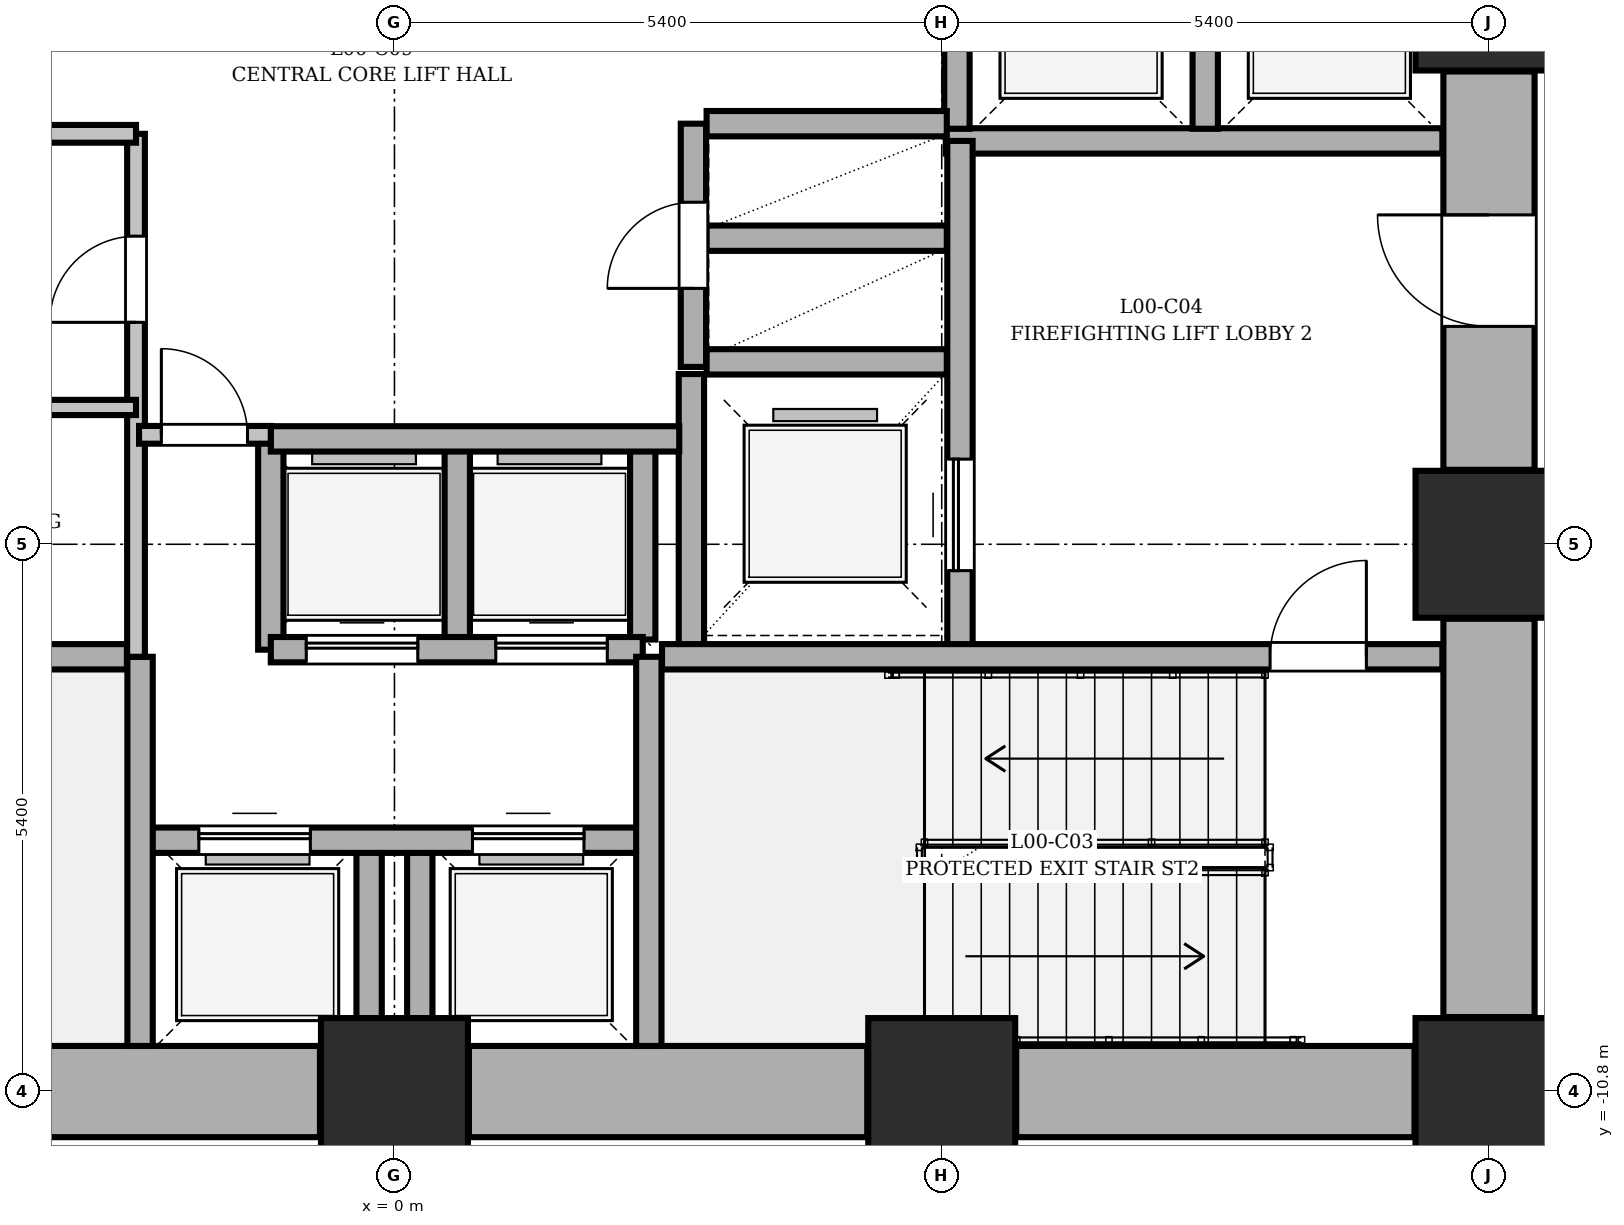
"""IFC4 building model, lengths in metres.
Left out: names, types, materials, properties, quantities, classifications, styles, units other than length and angle.
Written with IfcOpenShell. Run it as: python <this file> out.ifc"""

import sys

from ifc_helpers import new_model, si_unit, direction, frame, frame_2d, origin, origin_2d, place, context, subcontext, project, spatial, rectangle, extrude, element, fill, save


model = new_model("IFC4")
c1 = context("Model", 3, precision=1e-05, world=origin(), true_north=direction((0.0, 1.0)))
c2 = subcontext(c1, "Body", "Model", "MODEL_VIEW")
j1 = project(units=[si_unit("LENGTHUNIT", "METRE"), si_unit("PLANEANGLEUNIT", "RADIAN")], contexts=[c1])
p1 = place(None, origin())
s1 = spatial("IfcSite", under=j1, at=p1, CompositionType="ELEMENT")
p2 = place(p1, origin())
s2 = spatial("IfcBuilding", under=s1, at=p2, CompositionType="ELEMENT")
p3 = place(p2, origin())
s3 = spatial("IfcBuildingStorey", under=s2, at=p3, CompositionType="ELEMENT", Elevation=0.0)
for number, where, z_axis, x_axis in (
    (1, (0.0, -10.8, 0.0), (0.0, 0.0, 1.0), (1.0, 0.0, 0.0)),
    (2, (5.4, -10.8, 0.0), (0.0, 0.0, 1.0), (1.0, 0.0, 0.0)),
    (3, (10.8, -10.8, 0.0), (0.0, 0.0, 1.0), (1.0, 0.0, 0.0)),
    (4, (10.8, -5.4, 0.0), (0.0, 0.0, 1.0), (1.0, 0.0, 0.0)),
    (5, (10.8, 0.0, 0.0), (0.0, 0.0, 1.0), (1.0, 0.0, 0.0)),
):
    element("IfcColumn", number, at=place(p3, frame(where, z_axis=z_axis, x_axis=x_axis)), inside=s3, PredefinedType="COLUMN", context=c2, shape_type="SweptSolid", body=[
        extrude(rectangle(XDim=1.45, YDim=1.45, at=origin_2d()), origin(), (0.0, 0.0, 1.0), 4.5),
    ])
for number, where, z_axis, x_axis in (
    (6, (10.8, -10.065, 0.0), (0.0, 0.0, 1.0), (0.0, 1.0, 0.0)),
    (7, (-4.665, -10.8, 0.0), (0.0, 0.0, 1.0), (1.0, 0.0, 0.0)),
):
    element("IfcWall", number, at=place(p3, frame(where, z_axis=z_axis, x_axis=x_axis)), inside=s3, PredefinedType="SHEAR", context=c2, shape_type="SweptSolid", body=[
        extrude(rectangle(XDim=3.93, YDim=0.9, at=frame_2d((1.965, 0.0))), origin(), (0.0, 0.0, 1.0), 4.5),
    ])
p4 = place(p3, frame((10.8, -4.665, 0.0), z_axis=(0.0, 0.0, 1.0), x_axis=(0.0, 1.0, 0.0)))
e8 = element("IfcWall", 8, at=p4, inside=s3, PredefinedType="SHEAR", context=c2, shape_type="SweptSolid", body=[
    extrude(rectangle(XDim=3.93, YDim=0.9, at=frame_2d((1.965, 0.0))), origin(), (0.0, 0.0, 1.0), 4.5),
])
p5 = place(p4, frame((1.415, 0.0, 0.0)))
e9 = element("IfcOpeningElement", 9, at=p5, cuts=e8, PredefinedType="OPENING", context=c2, shape_type="SweptSolid", body=[
    extrude(rectangle(XDim=1.1, YDim=2.1, at=frame_2d((0.55, 1.05))), frame((0.0, 0.46, 0.0), z_axis=(0.0, -1.0, 0.0), x_axis=(1.0, 0.0, 0.0)), (0.0, 0.0, 1.0), 0.92),
])
for number, where, z_axis, x_axis in (
    (10, (0.735, -10.8, 0.0), (0.0, 0.0, 1.0), (1.0, 0.0, 0.0)),
    (11, (6.135, -10.8, 0.0), (0.0, 0.0, 1.0), (1.0, 0.0, 0.0)),
):
    element("IfcWall", number, at=place(p3, frame(where, z_axis=z_axis, x_axis=x_axis)), inside=s3, PredefinedType="SHEAR", context=c2, shape_type="SweptSolid", body=[
        extrude(rectangle(XDim=3.93, YDim=0.9, at=frame_2d((1.965, 0.0))), origin(), (0.0, 0.0, 1.0), 4.5),
    ])
p6 = place(p3, frame((2.93, -6.51, 0.0), z_axis=(0.0, 0.0, 1.0), x_axis=(0.0, 1.0, 0.0)))
e12 = element("IfcWall", 12, at=p6, inside=s3, PredefinedType="SHEAR", context=c2, shape_type="SweptSolid", body=[
    extrude(rectangle(XDim=2.79, YDim=0.25, at=frame_2d((1.395, 0.0))), origin(), (0.0, 0.0, 1.0), 4.5),
])
p7 = place(p3, frame((5.44, -1.42, 0.0), z_axis=(0.0, 0.0, 1.0), x_axis=(1.0, 0.0, 0.0)))
e13 = element("IfcWall", 13, at=p7, inside=s3, PredefinedType="SHEAR", context=c2, shape_type="SweptSolid", body=[
    extrude(rectangle(XDim=4.9, YDim=0.25, at=frame_2d((2.45, 0.0))), origin(), (0.0, 0.0, 1.0), 4.5),
])
p8 = place(p3, frame((3.08, -3.6, 0.0), z_axis=(0.0, 0.0, 1.0), x_axis=(1.0, 0.0, 0.0)))
e14 = element("IfcWall", 14, at=p8, inside=s3, PredefinedType="SHEAR", context=c2, shape_type="SweptSolid", body=[
    extrude(rectangle(XDim=2.37, YDim=0.25, at=frame_2d((1.185, 0.0))), origin(), (0.0, 0.0, 1.0), 4.5),
])
p9 = place(p3, frame((5.58, -6.51, 0.0), z_axis=(0.0, 0.0, 1.0), x_axis=(0.0, 1.0, 0.0)))
e15 = element("IfcWall", 15, at=p9, inside=s3, PredefinedType="SHEAR", context=c2, shape_type="SweptSolid", body=[
    extrude(rectangle(XDim=5.09, YDim=0.25, at=frame_2d((2.545, 0.0))), origin(), (0.0, 0.0, 1.0), 4.5),
])
p10 = place(p9, frame((0.85, 0.0, 0.0)))
e16 = element("IfcOpeningElement", 16, at=p10, cuts=e15, PredefinedType="OPENING", context=c2, shape_type="SweptSolid", body=[
    extrude(rectangle(XDim=1.1, YDim=2.1, at=frame_2d((0.55, 1.05))), frame((0.0, 0.135, 0.0), z_axis=(0.0, -1.0, 0.0), x_axis=(1.0, 0.0, 0.0)), (0.0, 0.0, 1.0), 0.27),
])
for number, where, z_axis, x_axis in (
    (17, (0.62, -6.34, 0.0), (0.0, 0.0, 1.0), (0.0, 1.0, 0.0)),
    (18, (2.45, -6.34, 0.0), (0.0, 0.0, 1.0), (0.0, 1.0, 0.0)),
):
    element("IfcWall", number, at=place(p3, frame(where, z_axis=z_axis, x_axis=x_axis)), inside=s3, PredefinedType="SHEAR", context=c2, shape_type="SweptSolid", body=[
        extrude(rectangle(XDim=1.88, YDim=0.25, at=frame_2d((0.94, 0.0))), origin(), (0.0, 0.0, 1.0), 4.5),
    ])
for number, where, z_axis, x_axis in (
    (19, (-0.25, -10.075, 0.0), (0.0, 0.0, 1.0), (0.0, 1.0, 0.0)),
    (20, (0.25, -10.075, 0.0), (0.0, 0.0, 1.0), (0.0, 1.0, 0.0)),
):
    element("IfcWall", number, at=place(p3, frame(where, z_axis=z_axis, x_axis=x_axis)), inside=s3, PredefinedType="SHEAR", context=c2, shape_type="SweptSolid", body=[
        extrude(rectangle(XDim=1.635, YDim=0.25, at=frame_2d((0.817, 0.0))), origin(), (0.0, 0.0, 1.0), 4.5),
    ])
p11 = place(p3, frame((-1.22, -6.44, 0.0), z_axis=(0.0, 0.0, 1.0), x_axis=(0.0, 1.0, 0.0)))
e21 = element("IfcWall", 21, at=p11, inside=s3, PredefinedType="SHEAR", context=c2, shape_type="SweptSolid", body=[
    extrude(rectangle(XDim=2.08, YDim=0.25, at=frame_2d((1.04, 0.0))), origin(), (0.0, 0.0, 1.0), 4.5),
])
p12 = place(p3, frame((-1.22, -6.44, 0.0), z_axis=(0.0, 0.0, 1.0), x_axis=(1.0, 0.0, 0.0)))
e22 = element("IfcWall", 22, at=p12, inside=s3, PredefinedType="SHEAR", context=c2, shape_type="SweptSolid", body=[
    extrude(rectangle(XDim=3.67, YDim=0.25, at=frame_2d((1.835, 0.0))), origin(), (0.0, 0.0, 1.0), 4.5),
])
p13 = place(p12, frame((0.35, 0.0, 0.0)))
e23 = element("IfcOpeningElement", 23, at=p13, cuts=e22, PredefinedType="OPENING", context=c2, shape_type="SweptSolid", body=[
    extrude(rectangle(XDim=1.1, YDim=2.1, at=frame_2d((0.55, 1.05))), frame((0.0, 0.135, 0.0), z_axis=(0.0, -1.0, 0.0), x_axis=(1.0, 0.0, 0.0)), (0.0, 0.0, 1.0), 0.27),
])
p14 = place(p12, frame((2.22, 0.0, 0.0)))
e24 = element("IfcOpeningElement", 24, at=p14, cuts=e22, PredefinedType="OPENING", context=c2, shape_type="SweptSolid", body=[
    extrude(rectangle(XDim=1.1, YDim=2.1, at=frame_2d((0.55, 1.05))), frame((0.0, 0.135, 0.0), z_axis=(0.0, -1.0, 0.0), x_axis=(1.0, 0.0, 0.0)), (0.0, 0.0, 1.0), 0.27),
])
p15 = place(p3, frame((-2.48, -8.32, 0.0), z_axis=(0.0, 0.0, 1.0), x_axis=(1.0, 0.0, 0.0)))
e25 = element("IfcWall", 25, at=p15, inside=s3, PredefinedType="SHEAR", context=c2, shape_type="SweptSolid", body=[
    extrude(rectangle(XDim=4.93, YDim=0.25, at=frame_2d((2.465, 0.0))), origin(), (0.0, 0.0, 1.0), 4.5),
])
p16 = place(p15, frame((0.55, 0.0, 0.0)))
e26 = element("IfcOpeningElement", 26, at=p16, cuts=e25, PredefinedType="OPENING", context=c2, shape_type="SweptSolid", body=[
    extrude(rectangle(XDim=1.1, YDim=2.1, at=frame_2d((0.55, 1.05))), frame((0.0, 0.135, 0.0), z_axis=(0.0, -1.0, 0.0), x_axis=(1.0, 0.0, 0.0)), (0.0, 0.0, 1.0), 0.27),
])
p17 = place(p15, frame((3.25, 0.0, 0.0)))
e27 = element("IfcOpeningElement", 27, at=p17, cuts=e25, PredefinedType="OPENING", context=c2, shape_type="SweptSolid", body=[
    extrude(rectangle(XDim=1.1, YDim=2.1, at=frame_2d((0.55, 1.05))), frame((0.0, 0.135, 0.0), z_axis=(0.0, -1.0, 0.0), x_axis=(1.0, 0.0, 0.0)), (0.0, 0.0, 1.0), 0.27),
])
p18 = place(p3, frame((-1.22, -4.36, 0.0), z_axis=(0.0, 0.0, 1.0), x_axis=(1.0, 0.0, 0.0)))
e28 = element("IfcWall", 28, at=p18, inside=s3, PredefinedType="SHEAR", context=c2, shape_type="SweptSolid", body=[
    extrude(rectangle(XDim=4.03, YDim=0.25, at=frame_2d((2.015, 0.0))), origin(), (0.0, 0.0, 1.0), 4.5),
])
for number, where, z_axis, x_axis in (
    (29, (5.55, -1.3, 0.0), (0.0, 0.0, 1.0), (0.0, 1.0, 0.0)),
    (30, (8.0, -1.3, 0.0), (0.0, 0.0, 1.0), (0.0, 1.0, 0.0)),
):
    element("IfcWall", number, at=place(p3, frame(where, z_axis=z_axis, x_axis=x_axis)), inside=s3, PredefinedType="SHEAR", context=c2, shape_type="SweptSolid", body=[
        extrude(rectangle(XDim=2.04, YDim=0.25, at=frame_2d((1.02, 0.0))), origin(), (0.0, 0.0, 1.0), 4.5),
    ])
for number, where, z_axis, x_axis in (
    (31, (3.08, -2.38, 0.0), (0.0, 0.0, 1.0), (1.0, 0.0, 0.0)),
    (32, (3.08, -1.25, 0.0), (0.0, 0.0, 1.0), (1.0, 0.0, 0.0)),
):
    element("IfcWall", number, at=place(p3, frame(where, z_axis=z_axis, x_axis=x_axis)), inside=s3, PredefinedType="SHEAR", context=c2, shape_type="SweptSolid", body=[
        extrude(rectangle(XDim=2.37, YDim=0.25, at=frame_2d((1.185, 0.0))), origin(), (0.0, 0.0, 1.0), 4.5),
    ])
p19 = place(p3, frame((2.95, -3.65, 0.0), z_axis=(0.0, 0.0, 1.0), x_axis=(0.0, 1.0, 0.0)))
e33 = element("IfcWall", 33, at=p19, inside=s3, PredefinedType="SHEAR", context=c2, shape_type="SweptSolid", body=[
    extrude(rectangle(XDim=2.4, YDim=0.25, at=frame_2d((1.2, 0.0))), origin(), (0.0, 0.0, 1.0), 4.5),
])
p20 = place(p19, frame((0.775, 0.0, 0.0)))
e34 = element("IfcOpeningElement", 34, at=p20, cuts=e33, PredefinedType="OPENING", context=c2, shape_type="SweptSolid", body=[
    extrude(rectangle(XDim=0.85, YDim=2.1, at=frame_2d((0.425, 1.05))), frame((0.0, 0.135, 0.0), z_axis=(0.0, -1.0, 0.0), x_axis=(1.0, 0.0, 0.0)), (0.0, 0.0, 1.0), 0.27),
])
p21 = place(p3, frame((2.64, -6.51, 0.0), z_axis=(0.0, 0.0, 1.0), x_axis=(1.0, 0.0, 0.0)))
e35 = element("IfcWall", 35, at=p21, inside=s3, PredefinedType="SHEAR", context=c2, shape_type="SweptSolid", body=[
    extrude(rectangle(XDim=7.7, YDim=0.25, at=frame_2d((3.85, 0.0))), origin(), (0.0, 0.0, 1.0), 4.5),
])
p22 = place(p21, frame((6.0, 0.0, 0.0)))
e36 = element("IfcOpeningElement", 36, at=p22, cuts=e35, PredefinedType="OPENING", context=c2, shape_type="SweptSolid", body=[
    extrude(rectangle(XDim=0.95, YDim=2.1, at=frame_2d((0.475, 1.05))), frame((0.0, 0.135, 0.0), z_axis=(0.0, -1.0, 0.0), x_axis=(1.0, 0.0, 0.0)), (0.0, 0.0, 1.0), 0.27),
])
for number, where, z_axis, x_axis in (
    (37, (2.51, -10.35, 0.0), (0.0, 0.0, 1.0), (0.0, 1.0, 0.0)),
    (38, (-2.51, -10.35, 0.0), (0.0, 0.0, 1.0), (0.0, 1.0, 0.0)),
):
    element("IfcWall", number, at=place(p3, frame(where, z_axis=z_axis, x_axis=x_axis)), inside=s3, PredefinedType="SHEAR", context=c2, shape_type="SweptSolid", body=[
        extrude(rectangle(XDim=3.84, YDim=0.25, at=frame_2d((1.92, 0.0))), origin(), (0.0, 0.0, 1.0), 4.5),
    ])
p23 = place(p3, frame((-10.34, -6.51, 0.0), z_axis=(0.0, 0.0, 1.0), x_axis=(1.0, 0.0, 0.0)))
e39 = element("IfcWall", 39, at=p23, inside=s3, PredefinedType="SHEAR", context=c2, shape_type="SweptSolid", body=[
    extrude(rectangle(XDim=7.7, YDim=0.25, at=frame_2d((3.85, 0.0))), origin(), (0.0, 0.0, 1.0), 4.5),
])
p24 = place(p23, frame((0.35, 0.0, 0.0)))
e40 = element("IfcOpeningElement", 40, at=p24, cuts=e39, PredefinedType="OPENING", context=c2, shape_type="SweptSolid", body=[
    extrude(rectangle(XDim=1.1, YDim=2.1, at=frame_2d((0.55, 1.05))), frame((0.0, 0.135, 0.0), z_axis=(0.0, -1.0, 0.0), x_axis=(1.0, 0.0, 0.0)), (0.0, 0.0, 1.0), 0.27),
])
p25 = place(p3, frame((-2.55, -6.51, 0.0), z_axis=(0.0, 0.0, 1.0), x_axis=(0.0, 1.0, 0.0)))
e41 = element("IfcWall", 41, at=p25, inside=s3, PredefinedType="PARTITIONING", context=c2, shape_type="SweptSolid", body=[
    extrude(rectangle(XDim=5.16, YDim=0.175, at=frame_2d((2.58, 0.0))), origin(), (0.0, 0.0, 1.0), 4.2),
])
p26 = place(p25, frame((3.3, 0.0, 0.0)))
e42 = element("IfcOpeningElement", 42, at=p26, cuts=e41, PredefinedType="OPENING", context=c2, shape_type="SweptSolid", body=[
    extrude(rectangle(XDim=0.85, YDim=2.1, at=frame_2d((0.425, 1.05))), frame((0.0, 0.097, 0.0), z_axis=(0.0, -1.0, 0.0), x_axis=(1.0, 0.0, 0.0)), (0.0, 0.0, 1.0), 0.195),
])
p27 = place(p3, frame((-7.18, -4.05, 0.0), z_axis=(0.0, 0.0, 1.0), x_axis=(1.0, 0.0, 0.0)))
e43 = element("IfcWall", 43, at=p27, inside=s3, PredefinedType="PARTITIONING", context=c2, shape_type="SweptSolid", body=[
    extrude(rectangle(XDim=4.63, YDim=0.15, at=frame_2d((2.315, 0.0))), origin(), (0.0, 0.0, 1.0), 4.2),
])
p28 = place(p27, frame((1.0, 0.0, 0.0)))
e44 = element("IfcOpeningElement", 44, at=p28, cuts=e43, PredefinedType="OPENING", context=c2, shape_type="SweptSolid", body=[
    extrude(rectangle(XDim=0.85, YDim=2.1, at=frame_2d((0.425, 1.05))), frame((0.0, 0.085, 0.0), z_axis=(0.0, -1.0, 0.0), x_axis=(1.0, 0.0, 0.0)), (0.0, 0.0, 1.0), 0.17),
])
p29 = place(p3, frame((-7.18, -1.35, 0.0), z_axis=(0.0, 0.0, 1.0), x_axis=(1.0, 0.0, 0.0)))
e45 = element("IfcWall", 45, at=p29, inside=s3, PredefinedType="PARTITIONING", context=c2, shape_type="SweptSolid", body=[
    extrude(rectangle(XDim=4.63, YDim=0.175, at=frame_2d((2.315, 0.0))), origin(), (0.0, 0.0, 1.0), 4.2),
])
p30 = place(p3, frame((-2.52, -4.32, 0.0), z_axis=(0.0, 0.0, 1.0), x_axis=(1.0, 0.0, 0.0)))
e46 = element("IfcWall", 46, at=p30, inside=s3, PredefinedType="PARTITIONING", context=c2, shape_type="SweptSolid", body=[
    extrude(rectangle(XDim=1.3, YDim=0.175, at=frame_2d((0.65, 0.0))), origin(), (0.0, 0.0, 1.0), 4.2),
])
p31 = place(p30, frame((0.22, 0.0, 0.0)))
e47 = element("IfcOpeningElement", 47, at=p31, cuts=e46, PredefinedType="OPENING", context=c2, shape_type="SweptSolid", body=[
    extrude(rectangle(XDim=0.85, YDim=2.1, at=frame_2d((0.425, 1.05))), frame((0.0, 0.097, 0.0), z_axis=(0.0, -1.0, 0.0), x_axis=(1.0, 0.0, 0.0)), (0.0, 0.0, 1.0), 0.195),
])
p32 = place(p22, origin())
e48 = element("IfcDoor", 48, at=p32, inside=s3, OperationType="SINGLE_SWING_RIGHT", PredefinedType="DOOR", context=c2, shape_type="SweptSolid", body=[
    extrude(rectangle(XDim=0.95, YDim=2.1, at=frame_2d((0.475, 1.05))), frame((0.0, 0.025, 0.0), z_axis=(0.0, -1.0, 0.0), x_axis=(1.0, 0.0, 0.0)), (0.0, 0.0, 1.0), 0.05),
])
fill(e36, e48)
p33 = place(p20, origin())
e49 = element("IfcDoor", 49, at=p33, inside=s3, OperationType="SINGLE_SWING_LEFT", PredefinedType="DOOR", context=c2, shape_type="SweptSolid", body=[
    extrude(rectangle(XDim=0.85, YDim=2.1, at=frame_2d((0.425, 1.05))), frame((0.0, 0.025, 0.0), z_axis=(0.0, -1.0, 0.0), x_axis=(1.0, 0.0, 0.0)), (0.0, 0.0, 1.0), 0.05),
])
fill(e34, e49)
p34 = place(p5, origin())
e50 = element("IfcDoor", 50, at=p34, inside=s3, OperationType="SINGLE_SWING_RIGHT", PredefinedType="DOOR", context=c2, shape_type="SweptSolid", body=[
    extrude(rectangle(XDim=1.1, YDim=2.1, at=frame_2d((0.55, 1.05))), frame((0.0, 0.025, 0.0), z_axis=(0.0, -1.0, 0.0), x_axis=(1.0, 0.0, 0.0)), (0.0, 0.0, 1.0), 0.05),
])
fill(e9, e50)
p35 = place(p10, origin())
e51 = element("IfcDoor", 51, at=p35, inside=s3, OperationType="SLIDING_TO_RIGHT", PredefinedType="DOOR", context=c2, shape_type="SweptSolid", body=[
    extrude(rectangle(XDim=1.1, YDim=2.1, at=frame_2d((0.55, 1.05))), frame((0.0, 0.025, 0.0), z_axis=(0.0, -1.0, 0.0), x_axis=(1.0, 0.0, 0.0)), (0.0, 0.0, 1.0), 0.05),
])
fill(e16, e51)
p36 = place(p31, origin())
e52 = element("IfcDoor", 52, at=p36, inside=s3, OperationType="SINGLE_SWING_LEFT", PredefinedType="DOOR", context=c2, shape_type="SweptSolid", body=[
    extrude(rectangle(XDim=0.85, YDim=2.1, at=frame_2d((0.425, 1.05))), frame((0.0, 0.025, 0.0), z_axis=(0.0, -1.0, 0.0), x_axis=(1.0, 0.0, 0.0)), (0.0, 0.0, 1.0), 0.05),
])
fill(e47, e52)
p37 = place(p13, origin())
e53 = element("IfcDoor", 53, at=p37, inside=s3, OperationType="SLIDING_TO_LEFT", PredefinedType="DOOR", context=c2, shape_type="SweptSolid", body=[
    extrude(rectangle(XDim=1.1, YDim=2.1, at=frame_2d((0.55, 1.05))), frame((0.0, 0.025, 0.0), z_axis=(0.0, -1.0, 0.0), x_axis=(1.0, 0.0, 0.0)), (0.0, 0.0, 1.0), 0.05),
])
fill(e23, e53)
p38 = place(p14, origin())
e54 = element("IfcDoor", 54, at=p38, inside=s3, OperationType="SLIDING_TO_LEFT", PredefinedType="DOOR", context=c2, shape_type="SweptSolid", body=[
    extrude(rectangle(XDim=1.1, YDim=2.1, at=frame_2d((0.55, 1.05))), frame((0.0, 0.025, 0.0), z_axis=(0.0, -1.0, 0.0), x_axis=(1.0, 0.0, 0.0)), (0.0, 0.0, 1.0), 0.05),
])
fill(e24, e54)
p39 = place(p16, origin())
e55 = element("IfcDoor", 55, at=p39, inside=s3, OperationType="SLIDING_TO_LEFT", PredefinedType="DOOR", context=c2, shape_type="SweptSolid", body=[
    extrude(rectangle(XDim=1.1, YDim=2.1, at=frame_2d((0.55, 1.05))), frame((0.0, 0.025, 0.0), z_axis=(0.0, -1.0, 0.0), x_axis=(1.0, 0.0, 0.0)), (0.0, 0.0, 1.0), 0.05),
])
fill(e26, e55)
p40 = place(p17, origin())
e56 = element("IfcDoor", 56, at=p40, inside=s3, OperationType="SLIDING_TO_LEFT", PredefinedType="DOOR", context=c2, shape_type="SweptSolid", body=[
    extrude(rectangle(XDim=1.1, YDim=2.1, at=frame_2d((0.55, 1.05))), frame((0.0, 0.025, 0.0), z_axis=(0.0, -1.0, 0.0), x_axis=(1.0, 0.0, 0.0)), (0.0, 0.0, 1.0), 0.05),
])
fill(e27, e56)
p41 = place(p26, origin())
e57 = element("IfcDoor", 57, at=p41, inside=s3, OperationType="SINGLE_SWING_LEFT", PredefinedType="DOOR", context=c2, shape_type="SweptSolid", body=[
    extrude(rectangle(XDim=0.85, YDim=2.1, at=frame_2d((0.425, 1.05))), frame((0.0, 0.025, 0.0), z_axis=(0.0, -1.0, 0.0), x_axis=(1.0, 0.0, 0.0)), (0.0, 0.0, 1.0), 0.05),
])
fill(e42, e57)
save(model, sys.argv[1])
